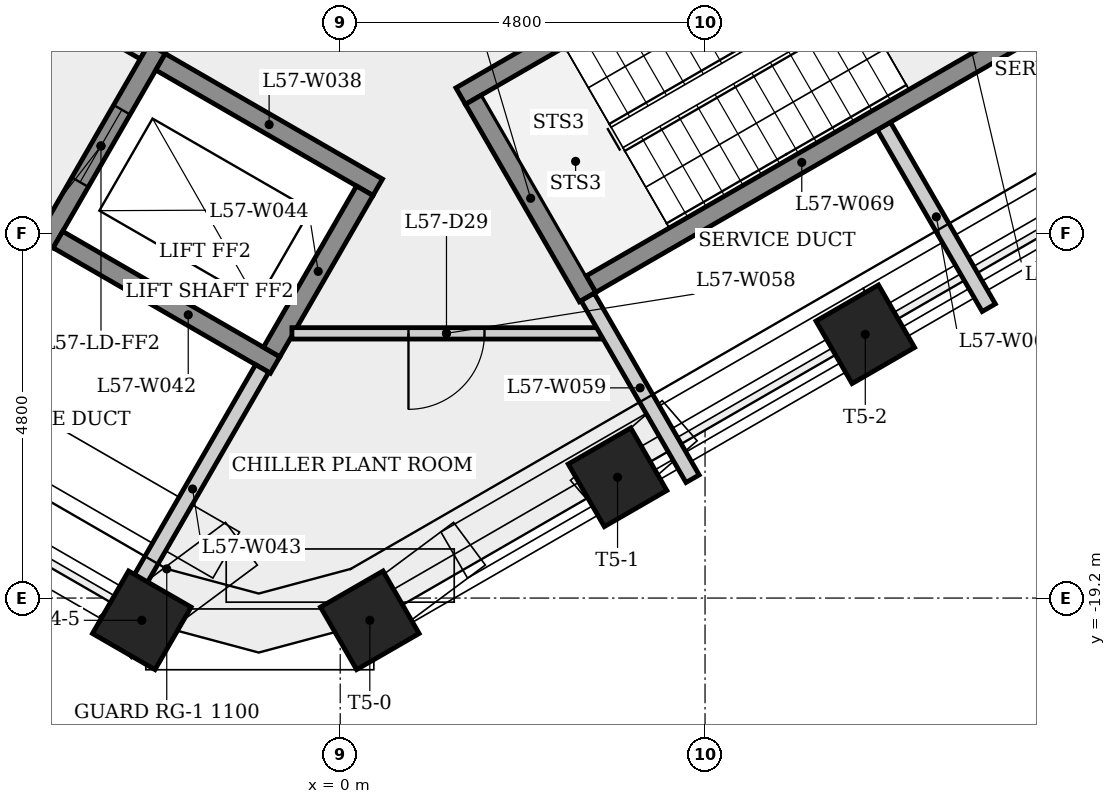
"""IFC4 building model, lengths in metres.
Left out: names, types, materials, properties, quantities, classifications, styles, units other than length and angle.
Written with IfcOpenShell. Run it as: python <this file> out.ifc"""

import sys

from ifc_helpers import new_model, si_unit, direction, frame, frame_2d, origin, origin_2d, place, context, subcontext, project, spatial, rectangle, extrude, element, fill, save


model = new_model("IFC4")
c1 = context("Model", 3, precision=1e-05, world=origin(), true_north=direction((0.0, 1.0)))
c2 = subcontext(c1, "Body", "Model", "MODEL_VIEW")
j1 = project(units=[si_unit("LENGTHUNIT", "METRE"), si_unit("PLANEANGLEUNIT", "RADIAN")], contexts=[c1])
p1 = place(None, origin())
s1 = spatial("IfcSite", under=j1, at=p1, CompositionType="ELEMENT")
p2 = place(p1, origin())
s2 = spatial("IfcBuilding", under=s1, at=p2, CompositionType="ELEMENT")
p3 = place(p2, frame((0.0, 0.0, 214.1)))
s3 = spatial("IfcBuildingStorey", under=s2, at=p3, CompositionType="ELEMENT", Elevation=214.1)
for number, where, z_axis, x_axis in (
    (1, (-2.611, -19.493, 0.0), (0.0, 0.0, 1.0), (-0.5, -0.866, 0.0)),
    (2, (0.389, -19.493, 0.0), (0.0, 0.0, 1.0), (0.5, -0.866, 0.0)),
    (3, (3.649, -17.611, 0.0), (0.0, 0.0, 1.0), (0.5, -0.866, 0.0)),
    (4, (6.908, -15.729, 0.0), (0.0, 0.0, 1.0), (0.5, -0.866, 0.0)),
):
    element("IfcColumn", number, at=place(p3, frame(where, z_axis=z_axis, x_axis=x_axis)), inside=s3, PredefinedType="COLUMN", context=c2, shape_type="SweptSolid", body=[
        extrude(rectangle(XDim=0.95, YDim=0.95, at=origin_2d()), origin(), (0.0, 0.0, 1.0), 4.45),
    ])
p4 = place(p3, frame((-6.435, -9.795, 0.0), z_axis=(0.0, 0.0, 1.0), x_axis=(0.866012907634, -0.500021643343, 0.0)))
e5 = element("IfcWall", 5, at=p4, inside=s3, PredefinedType="PARTITIONING", context=c2, shape_type="SweptSolid", body=[
    extrude(rectangle(XDim=4.45, YDim=0.2, at=frame_2d((2.225, 0.0))), origin(), (0.0, 0.0, 1.0), 4.45),
])
p5 = place(p4, frame((1.675, 0.0, 0.0)))
e6 = element("IfcOpeningElement", 6, at=p5, cuts=e5, PredefinedType="OPENING", context=c2, shape_type="SweptSolid", body=[
    extrude(rectangle(XDim=1.1, YDim=2.1, at=frame_2d((0.55, 1.05))), frame((0.0, 0.11, 0.0), z_axis=(0.0, -1.0, 0.0), x_axis=(1.0, 0.0, 0.0)), (0.0, 0.0, 1.0), 0.22),
])
p6 = place(p3, frame((-2.41, -11.974, 0.0), z_axis=(0.0, 0.0, 1.0), x_axis=(-0.500001826776, -0.866024349092, 0.0)))
e7 = element("IfcWall", 7, at=p6, inside=s3, PredefinedType="SHEAR", context=c2, shape_type="SweptSolid", body=[
    extrude(rectangle(XDim=2.95, YDim=0.25, at=frame_2d((1.475, 0.0))), origin(), (0.0, 0.0, 1.0), 4.45),
])
p7 = place(p6, frame((0.925, 0.0, 0.0)))
e8 = element("IfcOpeningElement", 8, at=p7, cuts=e7, PredefinedType="OPENING", context=c2, shape_type="SweptSolid", body=[
    extrude(rectangle(XDim=1.1, YDim=2.1, at=frame_2d((0.55, 1.05))), frame((0.0, 0.135, 0.0), z_axis=(0.0, -1.0, 0.0), x_axis=(1.0, 0.0, 0.0)), (0.0, 0.0, 1.0), 0.27),
])
p8 = place(p3, frame((-2.364, -12.145, 0.0), z_axis=(0.0, 0.0, 1.0), x_axis=(0.866040211805, -0.499974350878, 0.0)))
e9 = element("IfcWall", 9, at=p8, inside=s3, PredefinedType="SHEAR", context=c2, shape_type="SweptSolid", body=[
    extrude(rectangle(XDim=3.3, YDim=0.25, at=frame_2d((1.65, 0.0))), origin(), (0.0, 0.0, 1.0), 4.45),
])
p9 = place(p3, frame((-0.856, -16.133, 0.0), z_axis=(0.0, 0.0, 1.0), x_axis=(-0.866021716278, 0.500006386895, 0.0)))
e10 = element("IfcWall", 10, at=p9, inside=s3, PredefinedType="SHEAR", context=c2, shape_type="SweptSolid", body=[
    extrude(rectangle(XDim=3.3, YDim=0.25, at=frame_2d((1.65, 0.0))), origin(), (0.0, 0.0, 1.0), 4.45),
])
p10 = place(p3, frame((-1.027, -16.179, 0.0), z_axis=(0.0, 0.0, 1.0), x_axis=(-0.499989866495, -0.866031254287, 0.0)))
e11 = element("IfcWall", 11, at=p10, inside=s3, PredefinedType="PLUMBINGWALL", context=c2, shape_type="SweptSolid", body=[
    extrude(rectangle(XDim=3.662, YDim=0.2, at=frame_2d((1.831, 0.0))), origin(), (0.0, 0.0, 1.0), 4.45),
])
p11 = place(p3, frame((-0.902, -15.962, 0.0), z_axis=(0.0, 0.0, 1.0), x_axis=(0.500061746146, 0.865989751695, 0.0)))
e12 = element("IfcWall", 12, at=p11, inside=s3, PredefinedType="SHEAR", context=c2, shape_type="SweptSolid", body=[
    extrude(rectangle(XDim=2.45, YDim=0.25, at=frame_2d((1.225, 0.0))), origin(), (0.0, 0.0, 1.0), 4.8),
])
p12 = place(p3, frame((1.585, -12.595, 0.0), z_axis=(0.0, 0.0, 1.0), x_axis=(0.866036417653, 0.499980922934, 0.0)))
e13 = element("IfcWall", 13, at=p12, inside=s3, PredefinedType="SHEAR", context=c2, shape_type="SweptSolid", body=[
    extrude(rectangle(XDim=6.65, YDim=0.25, at=frame_2d((3.325, 0.0))), origin(), (0.0, 0.0, 1.0), 4.45),
])
p13 = place(p12, frame((5.275, 0.0, 0.0)))
e14 = element("IfcOpeningElement", 14, at=p13, cuts=e13, PredefinedType="OPENING", context=c2, shape_type="SweptSolid", body=[
    extrude(rectangle(XDim=1.0, YDim=2.1, at=frame_2d((0.5, 1.05))), frame((0.0, 0.135, 0.0), z_axis=(0.0, -1.0, 0.0), x_axis=(1.0, 0.0, 0.0)), (0.0, 0.0, 1.0), 0.27),
])
p14 = place(p3, frame((3.256, -15.239, 0.0), z_axis=(0.0, 0.0, 1.0), x_axis=(-0.50002537861, 0.866010750942, 0.0)))
e15 = element("IfcWall", 15, at=p14, inside=s3, PredefinedType="SHEAR", context=c2, shape_type="SweptSolid", body=[
    extrude(rectangle(XDim=3.0, YDim=0.25, at=frame_2d((1.5, 0.0))), origin(), (0.0, 0.0, 1.0), 4.45),
])
p15 = place(p3, frame((3.432, -15.717, 0.0), z_axis=(0.0, 0.0, 1.0), x_axis=(-1.0, 0.0, 0.0)))
e16 = element("IfcWall", 16, at=p15, inside=s3, PredefinedType="PARTITIONING", context=c2, shape_type="SweptSolid", body=[
    extrude(rectangle(XDim=4.067, YDim=0.15, at=frame_2d((2.034, 0.0))), origin(), (0.0, 0.0, 1.0), 4.45),
])
p16 = place(p15, frame((1.534, 0.0, 0.0)))
e17 = element("IfcOpeningElement", 17, at=p16, cuts=e16, PredefinedType="OPENING", context=c2, shape_type="SweptSolid", body=[
    extrude(rectangle(XDim=1.0, YDim=2.1, at=frame_2d((0.5, 1.05))), frame((0.0, 0.085, 0.0), z_axis=(0.0, -1.0, 0.0), x_axis=(1.0, 0.0, 0.0)), (0.0, 0.0, 1.0), 0.17),
])
for number, where, z_axis, x_axis in (
    (18, (3.256, -15.239, 0.0), (0.0, 0.0, 1.0), (0.5, -0.866, 0.0)),
    (19, (7.153, -12.989, 0.0), (0.0, 0.0, 1.0), (0.5, -0.866, 0.0)),
):
    element("IfcWall", number, at=place(p3, frame(where, z_axis=z_axis, x_axis=x_axis)), inside=s3, PredefinedType="PLUMBINGWALL", context=c2, shape_type="SweptSolid", body=[
        extrude(rectangle(XDim=2.761, YDim=0.2, at=frame_2d((1.38, 0.0))), origin(), (0.0, 0.0, 1.0), 4.45),
    ])
p17 = place(p3, frame((3.301, -15.068, 0.0), z_axis=(0.0, 0.0, 1.0), x_axis=(0.866035036182, 0.499983315828, 0.0)))
e20 = element("IfcWall", 20, at=p17, inside=s3, PredefinedType="SHEAR", context=c2, shape_type="SweptSolid", body=[
    extrude(rectangle(XDim=6.4, YDim=0.25, at=frame_2d((3.2, 0.0))), origin(), (0.0, 0.0, 1.0), 4.45),
])
p18 = place(p7, origin())
e21 = element("IfcDoor", 21, at=p18, inside=s3, OperationType="SLIDING_TO_LEFT", PredefinedType="DOOR", context=c2, shape_type="SweptSolid", body=[
    extrude(rectangle(XDim=1.1, YDim=2.1, at=frame_2d((0.55, 1.05))), frame((0.0, 0.025, 0.0), z_axis=(0.0, -1.0, 0.0), x_axis=(1.0, 0.0, 0.0)), (0.0, 0.0, 1.0), 0.05),
])
fill(e8, e21)
p19 = place(p16, origin())
e22 = element("IfcDoor", 22, at=p19, inside=s3, OperationType="SINGLE_SWING_RIGHT", PredefinedType="DOOR", context=c2, shape_type="SweptSolid", body=[
    extrude(rectangle(XDim=1.0, YDim=2.1, at=frame_2d((0.5, 1.05))), frame((0.0, 0.025, 0.0), z_axis=(0.0, -1.0, 0.0), x_axis=(1.0, 0.0, 0.0)), (0.0, 0.0, 1.0), 0.05),
])
fill(e17, e22)
save(model, sys.argv[1])
